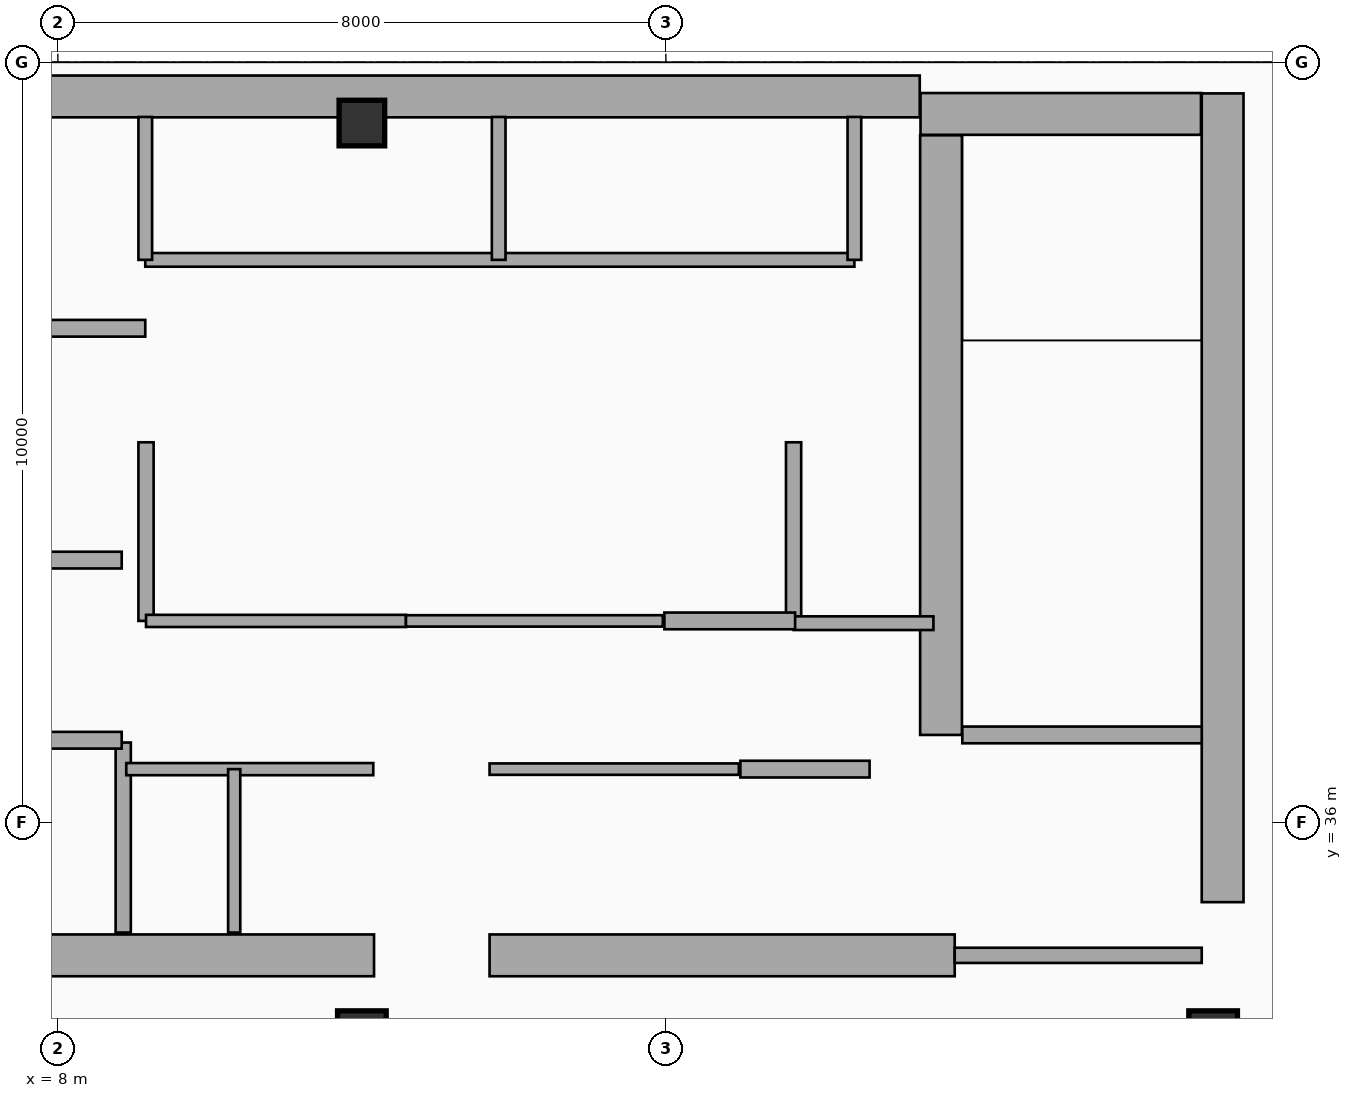
"""IFC4 building model, lengths in metres.
Left out: names, types, materials, properties, quantities, classifications, styles, units other than length and angle.
Written with IfcOpenShell. Run it as: python <this file> out.ifc"""

import sys

from ifc_helpers import new_model, si_unit, direction, frame, frame_2d, origin, origin_2d, place, context, subcontext, project, spatial, rectangle, extrude, element, fill, save


model = new_model("IFC4")
c1 = context("Model", 3, precision=1e-05, world=origin(), true_north=direction((0.0, 1.0)))
c2 = subcontext(c1, "Body", "Model", "MODEL_VIEW")
j1 = project(units=[si_unit("LENGTHUNIT", "METRE"), si_unit("PLANEANGLEUNIT", "RADIAN")], contexts=[c1])
p1 = place(None, origin())
s1 = spatial("IfcSite", under=j1, at=p1, CompositionType="ELEMENT")
p2 = place(p1, origin())
s2 = spatial("IfcBuilding", under=s1, at=p2, CompositionType="ELEMENT")
p3 = place(p2, frame((0.0, 0.0, 347.49)))
s3 = spatial("IfcBuildingStorey", under=s2, at=p3, CompositionType="ELEMENT", Elevation=347.49)
p4 = place(p3, frame((5.36, 45.55, 0.0), z_axis=(0.0, 0.0, 1.0), x_axis=(1.0, 0.0, 0.0)))
e1 = element("IfcWall", 1, at=p4, inside=s3, PredefinedType="SHEAR", context=c2, shape_type="SweptSolid", body=[
    extrude(rectangle(XDim=13.98, YDim=0.55, at=frame_2d((6.99, 0.0))), origin(), (0.0, 0.0, 1.0), 4.62),
])
p5 = place(p3, frame((23.325, 34.95, 0.0), z_axis=(0.0, 0.0, 1.0), x_axis=(0.0, 1.0, 0.0)))
e2 = element("IfcWall", 2, at=p5, inside=s3, PredefinedType="SHEAR", context=c2, shape_type="SweptSolid", body=[
    extrude(rectangle(XDim=10.64, YDim=0.55, at=frame_2d((5.32, 0.0))), origin(), (0.0, 0.0, 1.0), 4.62),
])
p6 = place(p3, frame((1.45, 34.25, 0.0), z_axis=(0.0, 0.0, 1.0), x_axis=(1.0, 0.0, 0.0)))
e3 = element("IfcWall", 3, at=p6, inside=s3, PredefinedType="SHEAR", context=c2, shape_type="SweptSolid", body=[
    extrude(rectangle(XDim=10.71, YDim=0.55, at=frame_2d((5.355, 0.0))), origin(), (0.0, 0.0, 1.0), 4.62),
])
p7 = place(p6, frame((7.25, 0.0, 0.0), z_axis=(0.0, 0.0, 1.0), x_axis=(-1.0, 0.0, 0.0)))
e4 = element("IfcOpeningElement", 4, at=p7, cuts=e3, PredefinedType="OPENING", context=c2, shape_type="SweptSolid", body=[
    extrude(rectangle(XDim=1.1, YDim=2.15, at=frame_2d((0.55, 1.075))), frame((0.0, 0.285, 0.0), z_axis=(0.0, -1.0, 0.0), x_axis=(1.0, 0.0, 0.0)), (0.0, 0.0, 1.0), 0.57),
])
p8 = place(p3, frame((13.68, 34.25, 0.0), z_axis=(0.0, 0.0, 1.0), x_axis=(1.0, 0.0, 0.0)))
e5 = element("IfcWall", 5, at=p8, inside=s3, PredefinedType="SHEAR", context=c2, shape_type="SweptSolid", body=[
    extrude(rectangle(XDim=6.12, YDim=0.55, at=frame_2d((3.06, 0.0))), origin(), (0.0, 0.0, 1.0), 4.62),
])
p9 = place(p3, frame((19.62, 37.15, 0.0), z_axis=(0.0, 0.0, 1.0), x_axis=(0.0, 1.0, 0.0)))
e6 = element("IfcWall", 6, at=p9, inside=s3, PredefinedType="SHEAR", context=c2, shape_type="SweptSolid", body=[
    extrude(rectangle(XDim=7.89, YDim=0.55, at=frame_2d((3.945, 0.0))), origin(), (0.0, 0.0, 1.0), 4.62),
])
p10 = place(p3, frame((19.35, 45.32, 0.0), z_axis=(0.0, 0.0, 1.0), x_axis=(1.0, 0.0, 0.0)))
e7 = element("IfcWall", 7, at=p10, inside=s3, PredefinedType="SHEAR", context=c2, shape_type="SweptSolid", body=[
    extrude(rectangle(XDim=3.69, YDim=0.55, at=frame_2d((1.845, 0.0))), origin(), (0.0, 0.0, 1.0), 4.62),
])
p11 = place(p10, frame((1.15, 0.0, 1.05)))
e8 = element("IfcOpeningElement", 8, at=p11, cuts=e7, PredefinedType="OPENING", context=c2, shape_type="SweptSolid", body=[
    extrude(rectangle(XDim=1.4, YDim=1.8, at=frame_2d((0.7, 0.9))), frame((0.0, 0.285, 0.0), z_axis=(0.0, -1.0, 0.0), x_axis=(1.0, 0.0, 0.0)), (0.0, 0.0, 1.0), 0.57),
])
p12 = place(p3, frame((12.0, 33.2, 0.0), z_axis=(0.0, 0.0, 1.0), x_axis=(1.0, 0.0, 0.0)))
e9 = element("IfcColumn", 9, at=p12, inside=s3, PredefinedType="COLUMN", context=c2, shape_type="SweptSolid", body=[
    extrude(rectangle(XDim=0.64, YDim=0.64, at=origin_2d()), origin(), (0.0, 0.0, 1.0), 4.62),
])
p13 = place(p3, frame((12.0, 45.2, 0.0), z_axis=(0.0, 0.0, 1.0), x_axis=(1.0, 0.0, 0.0)))
e10 = element("IfcColumn", 10, at=p13, inside=s3, PredefinedType="COLUMN", context=c2, shape_type="SweptSolid", body=[
    extrude(rectangle(XDim=0.6, YDim=0.6, at=origin_2d()), origin(), (0.0, 0.0, 1.0), 4.62),
])
p14 = place(p3, frame((23.2, 33.2, 0.0), z_axis=(0.0, 0.0, 1.0), x_axis=(1.0, 0.0, 0.0)))
e11 = element("IfcColumn", 11, at=p14, inside=s3, PredefinedType="COLUMN", context=c2, shape_type="SweptSolid", body=[
    extrude(rectangle(XDim=0.64, YDim=0.64, at=origin_2d()), origin(), (0.0, 0.0, 1.0), 4.62),
])
p15 = place(p3, frame((8.86, 34.55, 0.0), z_axis=(0.0, 0.0, 1.0), x_axis=(0.0, 1.0, 0.0)))
e12 = element("IfcWall", 12, at=p15, inside=s3, PredefinedType="PARTITIONING", context=c2, shape_type="SweptSolid", body=[
    extrude(rectangle(XDim=2.5, YDim=0.2, at=frame_2d((1.25, 0.0))), origin(), (0.0, 0.0, 1.0), 4.37),
])
p16 = place(p3, frame((19.9, 37.15, 0.0), z_axis=(0.0, 0.0, 1.0), x_axis=(1.0, 0.0, 0.0)))
e13 = element("IfcWall", 13, at=p16, inside=s3, PredefinedType="PARTITIONING", context=c2, shape_type="SweptSolid", body=[
    extrude(rectangle(XDim=3.15, YDim=0.22, at=frame_2d((1.575, 0.0))), origin(), (0.0, 0.0, 1.0), 4.37),
])
p17 = place(p16, frame((2.05, 0.0, 0.0), z_axis=(0.0, 0.0, 1.0), x_axis=(-1.0, 0.0, 0.0)))
e14 = element("IfcOpeningElement", 14, at=p17, cuts=e13, PredefinedType="OPENING", context=c2, shape_type="SweptSolid", body=[
    extrude(rectangle(XDim=1.05, YDim=2.15, at=frame_2d((0.525, 1.075))), frame((0.0, 0.12, 0.0), z_axis=(0.0, -1.0, 0.0), x_axis=(1.0, 0.0, 0.0)), (0.0, 0.0, 1.0), 0.24),
])
p18 = place(p3, frame((19.8, 34.25, 0.0), z_axis=(0.0, 0.0, 1.0), x_axis=(1.0, 0.0, 0.0)))
e15 = element("IfcWall", 15, at=p18, inside=s3, PredefinedType="PARTITIONING", context=c2, shape_type="SweptSolid", body=[
    extrude(rectangle(XDim=3.25, YDim=0.2, at=frame_2d((1.625, 0.0))), origin(), (0.0, 0.0, 1.0), 4.37),
])
p19 = place(p18, frame((2.15, 0.0, 0.0), z_axis=(0.0, 0.0, 1.0), x_axis=(-1.0, 0.0, 0.0)))
e16 = element("IfcOpeningElement", 16, at=p19, cuts=e15, PredefinedType="OPENING", context=c2, shape_type="SweptSolid", body=[
    extrude(rectangle(XDim=1.1, YDim=2.15, at=frame_2d((0.55, 1.075))), frame((0.0, 0.11, 0.0), z_axis=(0.0, -1.0, 0.0), x_axis=(1.0, 0.0, 0.0)), (0.0, 0.0, 1.0), 0.22),
])
p20 = place(p3, frame((5.38, 37.08, 0.0), z_axis=(0.0, 0.0, 1.0), x_axis=(1.0, 0.0, 0.0)))
e17 = element("IfcWall", 17, at=p20, inside=s3, PredefinedType="PARTITIONING", context=c2, shape_type="SweptSolid", body=[
    extrude(rectangle(XDim=3.46, YDim=0.22, at=frame_2d((1.73, 0.0))), origin(), (0.0, 0.0, 1.0), 4.37),
])
p21 = place(p20, frame((1.55, 0.0, 0.0), z_axis=(0.0, 0.0, 1.0), x_axis=(-1.0, 0.0, 0.0)))
e18 = element("IfcOpeningElement", 18, at=p21, cuts=e17, PredefinedType="OPENING", context=c2, shape_type="SweptSolid", body=[
    extrude(rectangle(XDim=1.2, YDim=2.2, at=frame_2d((0.6, 1.1))), frame((0.0, 0.12, 0.0), z_axis=(0.0, -1.0, 0.0), x_axis=(1.0, 0.0, 0.0)), (0.0, 0.0, 1.0), 0.24),
])
p22 = place(p20, frame((3.22, 0.0, 0.0), z_axis=(0.0, 0.0, 1.0), x_axis=(-1.0, 0.0, 0.0)))
e19 = element("IfcOpeningElement", 19, at=p22, cuts=e17, PredefinedType="OPENING", context=c2, shape_type="SweptSolid", body=[
    extrude(rectangle(XDim=1.2, YDim=2.2, at=frame_2d((0.6, 1.1))), frame((0.0, 0.12, 0.0), z_axis=(0.0, -1.0, 0.0), x_axis=(1.0, 0.0, 0.0)), (0.0, 0.0, 1.0), 0.24),
])
p23 = place(p3, frame((5.38, 39.45, 0.0), z_axis=(0.0, 0.0, 1.0), x_axis=(1.0, 0.0, 0.0)))
e20 = element("IfcWall", 20, at=p23, inside=s3, PredefinedType="PARTITIONING", context=c2, shape_type="SweptSolid", body=[
    extrude(rectangle(XDim=3.46, YDim=0.22, at=frame_2d((1.73, 0.0))), origin(), (0.0, 0.0, 1.0), 4.37),
])
p24 = place(p3, frame((5.38, 42.5, 0.0), z_axis=(0.0, 0.0, 1.0), x_axis=(1.0, 0.0, 0.0)))
e21 = element("IfcWall", 21, at=p24, inside=s3, PredefinedType="PARTITIONING", context=c2, shape_type="SweptSolid", body=[
    extrude(rectangle(XDim=3.77, YDim=0.22, at=frame_2d((1.885, 0.0))), origin(), (0.0, 0.0, 1.0), 4.37),
])
p25 = place(p24, frame((1.75, 0.0, 0.0), z_axis=(0.0, 0.0, 1.0), x_axis=(-1.0, 0.0, 0.0)))
e22 = element("IfcOpeningElement", 22, at=p25, cuts=e21, PredefinedType="OPENING", context=c2, shape_type="SweptSolid", body=[
    extrude(rectangle(XDim=1.4, YDim=2.2, at=frame_2d((0.7, 1.1))), frame((0.0, 0.12, 0.0), z_axis=(0.0, -1.0, 0.0), x_axis=(1.0, 0.0, 0.0)), (0.0, 0.0, 1.0), 0.24),
])
p26 = place(p24, frame((3.53, 0.0, 0.0), z_axis=(0.0, 0.0, 1.0), x_axis=(-1.0, 0.0, 0.0)))
e23 = element("IfcOpeningElement", 23, at=p26, cuts=e21, PredefinedType="OPENING", context=c2, shape_type="SweptSolid", body=[
    extrude(rectangle(XDim=1.4, YDim=2.2, at=frame_2d((0.7, 1.1))), frame((0.0, 0.12, 0.0), z_axis=(0.0, -1.0, 0.0), x_axis=(1.0, 0.0, 0.0)), (0.0, 0.0, 1.0), 0.24),
])
for number, where, z_axis, x_axis in (
    (24, (9.16, 38.65, 0.0), (0.0, 0.0, 1.0), (0.0, 1.0, 0.0)),
    (25, (17.68, 38.65, 0.0), (0.0, 0.0, 1.0), (0.0, 1.0, 0.0)),
):
    element("IfcWall", number, at=place(p3, frame(where, z_axis=z_axis, x_axis=x_axis)), inside=s3, PredefinedType="PARTITIONING", context=c2, shape_type="SweptSolid", body=[
        extrude(rectangle(XDim=2.35, YDim=0.2, at=frame_2d((1.175, 0.0))), origin(), (0.0, 0.0, 1.0), 4.37),
    ])
p27 = place(p3, frame((17.68, 38.62, 0.0), z_axis=(0.0, 0.0, 1.0), x_axis=(1.0, 0.0, 0.0)))
e26 = element("IfcWall", 26, at=p27, inside=s3, PredefinedType="PARTITIONING", context=c2, shape_type="SweptSolid", body=[
    extrude(rectangle(XDim=1.84, YDim=0.18, at=frame_2d((0.92, 0.0))), origin(), (0.0, 0.0, 1.0), 4.37),
])
p28 = place(p27, frame((0.24, 0.0, 0.0)))
e27 = element("IfcOpeningElement", 27, at=p28, cuts=e26, PredefinedType="OPENING", context=c2, shape_type="SweptSolid", body=[
    extrude(rectangle(XDim=0.92, YDim=2.1, at=frame_2d((0.46, 1.05))), frame((0.0, 0.1, 0.0), z_axis=(0.0, -1.0, 0.0), x_axis=(1.0, 0.0, 0.0)), (0.0, 0.0, 1.0), 0.2),
])
p29 = place(p3, frame((8.9, 36.7, 0.0), z_axis=(0.0, 0.0, 1.0), x_axis=(1.0, 0.0, 0.0)))
e28 = element("IfcWall", 28, at=p29, inside=s3, PredefinedType="PARTITIONING", context=c2, shape_type="SweptSolid", body=[
    extrude(rectangle(XDim=3.25, YDim=0.16, at=frame_2d((1.625, 0.0))), origin(), (0.0, 0.0, 1.0), 4.37),
])
p30 = place(p29, frame((0.26, 0.0, 0.0)))
e29 = element("IfcOpeningElement", 29, at=p30, cuts=e28, PredefinedType="OPENING", context=c2, shape_type="SweptSolid", body=[
    extrude(rectangle(XDim=0.9, YDim=2.15, at=frame_2d((0.45, 1.075))), frame((0.0, 0.09, 0.0), z_axis=(0.0, -1.0, 0.0), x_axis=(1.0, 0.0, 0.0)), (0.0, 0.0, 1.0), 0.18),
])
p31 = place(p29, frame((1.68, 0.0, 0.0)))
e30 = element("IfcOpeningElement", 30, at=p31, cuts=e28, PredefinedType="OPENING", context=c2, shape_type="SweptSolid", body=[
    extrude(rectangle(XDim=0.9, YDim=2.15, at=frame_2d((0.45, 1.075))), frame((0.0, 0.09, 0.0), z_axis=(0.0, -1.0, 0.0), x_axis=(1.0, 0.0, 0.0)), (0.0, 0.0, 1.0), 0.18),
])
p32 = place(p3, frame((10.32, 34.55, 0.0), z_axis=(0.0, 0.0, 1.0), x_axis=(0.0, 1.0, 0.0)))
e31 = element("IfcWall", 31, at=p32, inside=s3, PredefinedType="PARTITIONING", context=c2, shape_type="SweptSolid", body=[
    extrude(rectangle(XDim=2.15, YDim=0.16, at=frame_2d((1.075, 0.0))), origin(), (0.0, 0.0, 1.0), 4.37),
])
p33 = place(p3, frame((9.16, 38.65, 0.0), z_axis=(0.0, 0.0, 1.0), x_axis=(1.0, 0.0, 0.0)))
e32 = element("IfcWall", 32, at=p33, inside=s3, PredefinedType="PARTITIONING", context=c2, shape_type="SweptSolid", body=[
    extrude(rectangle(XDim=3.42, YDim=0.16, at=frame_2d((1.71, 0.0))), origin(), (0.0, 0.0, 1.0), 4.37),
])
p34 = place(p33, frame((2.15, 0.0, 0.0), z_axis=(0.0, 0.0, 1.0), x_axis=(-1.0, 0.0, 0.0)))
e33 = element("IfcOpeningElement", 33, at=p34, cuts=e32, PredefinedType="OPENING", context=c2, shape_type="SweptSolid", body=[
    extrude(rectangle(XDim=0.95, YDim=2.15, at=frame_2d((0.475, 1.075))), frame((0.0, 0.09, 0.0), z_axis=(0.0, -1.0, 0.0), x_axis=(1.0, 0.0, 0.0)), (0.0, 0.0, 1.0), 0.18),
])
p35 = place(p3, frame((13.68, 36.7, 0.0), z_axis=(0.0, 0.0, 1.0), x_axis=(1.0, 0.0, 0.0)))
e34 = element("IfcWall", 34, at=p35, inside=s3, PredefinedType="PARTITIONING", context=c2, shape_type="SweptSolid", body=[
    extrude(rectangle(XDim=3.28, YDim=0.15, at=frame_2d((1.64, 0.0))), origin(), (0.0, 0.0, 1.0), 4.37),
])
p36 = place(p35, frame((1.15, 0.0, 0.0)))
e35 = element("IfcOpeningElement", 35, at=p36, cuts=e34, PredefinedType="OPENING", context=c2, shape_type="SweptSolid", body=[
    extrude(rectangle(XDim=0.95, YDim=2.15, at=frame_2d((0.475, 1.075))), frame((0.0, 0.085, 0.0), z_axis=(0.0, -1.0, 0.0), x_axis=(1.0, 0.0, 0.0)), (0.0, 0.0, 1.0), 0.17),
])
p37 = place(p3, frame((12.58, 38.65, 0.0), z_axis=(0.0, 0.0, 1.0), x_axis=(1.0, 0.0, 0.0)))
e36 = element("IfcWall", 36, at=p37, inside=s3, PredefinedType="PARTITIONING", context=c2, shape_type="SweptSolid", body=[
    extrude(rectangle(XDim=3.38, YDim=0.15, at=frame_2d((1.69, 0.0))), origin(), (0.0, 0.0, 1.0), 4.37),
])
p38 = place(p37, frame((2.2, 0.0, 0.0), z_axis=(0.0, 0.0, 1.0), x_axis=(-1.0, 0.0, 0.0)))
e37 = element("IfcOpeningElement", 37, at=p38, cuts=e36, PredefinedType="OPENING", context=c2, shape_type="SweptSolid", body=[
    extrude(rectangle(XDim=1.05, YDim=2.15, at=frame_2d((0.525, 1.075))), frame((0.0, 0.085, 0.0), z_axis=(0.0, -1.0, 0.0), x_axis=(1.0, 0.0, 0.0)), (0.0, 0.0, 1.0), 0.17),
])
p39 = place(p3, frame((16.98, 36.7, 0.0), z_axis=(0.0, 0.0, 1.0), x_axis=(1.0, 0.0, 0.0)))
e38 = element("IfcWall", 38, at=p39, inside=s3, PredefinedType="PARTITIONING", context=c2, shape_type="SweptSolid", body=[
    extrude(rectangle(XDim=1.7, YDim=0.22, at=frame_2d((0.85, 0.0))), origin(), (0.0, 0.0, 1.0), 4.37),
])
p40 = place(p3, frame((15.98, 38.65, 0.0), z_axis=(0.0, 0.0, 1.0), x_axis=(1.0, 0.0, 0.0)))
e39 = element("IfcWall", 39, at=p40, inside=s3, PredefinedType="PARTITIONING", context=c2, shape_type="SweptSolid", body=[
    extrude(rectangle(XDim=1.72, YDim=0.22, at=frame_2d((0.86, 0.0))), origin(), (0.0, 0.0, 1.0), 4.37),
])
p41 = place(p3, frame((9.15, 43.4, 0.0), z_axis=(0.0, 0.0, 1.0), x_axis=(1.0, 0.0, 0.0)))
e40 = element("IfcWall", 40, at=p41, inside=s3, PredefinedType="PLUMBINGWALL", context=c2, shape_type="SweptSolid", body=[
    extrude(rectangle(XDim=9.33, YDim=0.18, at=frame_2d((4.665, 0.0))), origin(), (0.0, 0.0, 1.0), 4.37),
])
p42 = place(p41, frame((1.88, 0.0, 0.0)))
e41 = element("IfcOpeningElement", 41, at=p42, cuts=e40, PredefinedType="OPENING", context=c2, shape_type="SweptSolid", body=[
    extrude(rectangle(XDim=0.92, YDim=2.1, at=frame_2d((0.46, 1.05))), frame((0.0, 0.1, 0.0), z_axis=(0.0, -1.0, 0.0), x_axis=(1.0, 0.0, 0.0)), (0.0, 0.0, 1.0), 0.2),
])
p43 = place(p41, frame((6.515, 0.0, 0.0)))
e42 = element("IfcOpeningElement", 42, at=p43, cuts=e40, PredefinedType="OPENING", context=c2, shape_type="SweptSolid", body=[
    extrude(rectangle(XDim=0.92, YDim=2.1, at=frame_2d((0.46, 1.05))), frame((0.0, 0.1, 0.0), z_axis=(0.0, -1.0, 0.0), x_axis=(1.0, 0.0, 0.0)), (0.0, 0.0, 1.0), 0.2),
])
for number, where, z_axis, x_axis in (
    (43, (9.15, 43.4, 0.0), (0.0, 0.0, 1.0), (0.0, 1.0, 0.0)),
    (44, (18.48, 43.4, 0.0), (0.0, 0.0, 1.0), (0.0, 1.0, 0.0)),
    (45, (13.8, 43.4, 0.0), (0.0, 0.0, 1.0), (0.0, 1.0, 0.0)),
):
    element("IfcWall", number, at=place(p3, frame(where, z_axis=z_axis, x_axis=x_axis)), inside=s3, PredefinedType="PLUMBINGWALL", context=c2, shape_type="SweptSolid", body=[
        extrude(rectangle(XDim=1.88, YDim=0.18, at=frame_2d((0.94, 0.0))), origin(), (0.0, 0.0, 1.0), 4.37),
    ])
p44 = place(p11, origin())
e46 = element("IfcWindow", 46, at=p44, inside=s3, PartitioningType="SINGLE_PANEL", PredefinedType="WINDOW", context=c2, shape_type="SweptSolid", body=[
    extrude(rectangle(XDim=1.4, YDim=1.8, at=frame_2d((0.7, 0.9))), frame((0.0, 0.03, 0.0), z_axis=(0.0, -1.0, 0.0), x_axis=(1.0, 0.0, 0.0)), (0.0, 0.0, 1.0), 0.06),
])
fill(e8, e46)
p45 = place(p7, origin())
e47 = element("IfcDoor", 47, at=p45, inside=s3, OperationType="SINGLE_SWING_RIGHT", PredefinedType="DOOR", context=c2, shape_type="SweptSolid", body=[
    extrude(rectangle(XDim=1.1, YDim=2.15, at=frame_2d((0.55, 1.075))), frame((0.0, 0.025, 0.0), z_axis=(0.0, -1.0, 0.0), x_axis=(1.0, 0.0, 0.0)), (0.0, 0.0, 1.0), 0.05),
])
fill(e4, e47)
p46 = place(p17, origin())
e48 = element("IfcDoor", 48, at=p46, inside=s3, OperationType="SINGLE_SWING_LEFT", PredefinedType="DOOR", context=c2, shape_type="SweptSolid", body=[
    extrude(rectangle(XDim=1.05, YDim=2.15, at=frame_2d((0.525, 1.075))), frame((0.0, 0.025, 0.0), z_axis=(0.0, -1.0, 0.0), x_axis=(1.0, 0.0, 0.0)), (0.0, 0.0, 1.0), 0.05),
])
fill(e14, e48)
p47 = place(p19, origin())
e49 = element("IfcDoor", 49, at=p47, inside=s3, OperationType="SINGLE_SWING_RIGHT", PredefinedType="DOOR", context=c2, shape_type="SweptSolid", body=[
    extrude(rectangle(XDim=1.1, YDim=2.15, at=frame_2d((0.55, 1.075))), frame((0.0, 0.025, 0.0), z_axis=(0.0, -1.0, 0.0), x_axis=(1.0, 0.0, 0.0)), (0.0, 0.0, 1.0), 0.05),
])
fill(e16, e49)
p48 = place(p22, origin())
e50 = element("IfcDoor", 50, at=p48, inside=s3, OperationType="SLIDING_TO_RIGHT", PredefinedType="DOOR", context=c2, shape_type="SweptSolid", body=[
    extrude(rectangle(XDim=1.2, YDim=2.2, at=frame_2d((0.6, 1.1))), frame((0.0, 0.025, 0.0), z_axis=(0.0, -1.0, 0.0), x_axis=(1.0, 0.0, 0.0)), (0.0, 0.0, 1.0), 0.05),
])
fill(e19, e50)
p49 = place(p26, origin())
e51 = element("IfcDoor", 51, at=p49, inside=s3, OperationType="SLIDING_TO_LEFT", PredefinedType="DOOR", context=c2, shape_type="SweptSolid", body=[
    extrude(rectangle(XDim=1.4, YDim=2.2, at=frame_2d((0.7, 1.1))), frame((0.0, 0.025, 0.0), z_axis=(0.0, -1.0, 0.0), x_axis=(1.0, 0.0, 0.0)), (0.0, 0.0, 1.0), 0.05),
])
fill(e23, e51)
p50 = place(p28, origin())
e52 = element("IfcDoor", 52, at=p50, inside=s3, OperationType="SINGLE_SWING_LEFT", PredefinedType="DOOR", context=c2, shape_type="SweptSolid", body=[
    extrude(rectangle(XDim=0.92, YDim=2.1, at=frame_2d((0.46, 1.05))), frame((0.0, 0.025, 0.0), z_axis=(0.0, -1.0, 0.0), x_axis=(1.0, 0.0, 0.0)), (0.0, 0.0, 1.0), 0.05),
])
fill(e27, e52)
p51 = place(p30, origin())
e53 = element("IfcDoor", 53, at=p51, inside=s3, OperationType="SINGLE_SWING_RIGHT", PredefinedType="DOOR", context=c2, shape_type="SweptSolid", body=[
    extrude(rectangle(XDim=0.9, YDim=2.15, at=frame_2d((0.45, 1.075))), frame((0.0, 0.025, 0.0), z_axis=(0.0, -1.0, 0.0), x_axis=(1.0, 0.0, 0.0)), (0.0, 0.0, 1.0), 0.05),
])
fill(e29, e53)
p52 = place(p31, origin())
e54 = element("IfcDoor", 54, at=p52, inside=s3, OperationType="SINGLE_SWING_LEFT", PredefinedType="DOOR", context=c2, shape_type="SweptSolid", body=[
    extrude(rectangle(XDim=0.9, YDim=2.15, at=frame_2d((0.45, 1.075))), frame((0.0, 0.025, 0.0), z_axis=(0.0, -1.0, 0.0), x_axis=(1.0, 0.0, 0.0)), (0.0, 0.0, 1.0), 0.05),
])
fill(e30, e54)
p53 = place(p34, origin())
e55 = element("IfcDoor", 55, at=p53, inside=s3, OperationType="SINGLE_SWING_RIGHT", PredefinedType="DOOR", context=c2, shape_type="SweptSolid", body=[
    extrude(rectangle(XDim=0.95, YDim=2.15, at=frame_2d((0.475, 1.075))), frame((0.0, 0.025, 0.0), z_axis=(0.0, -1.0, 0.0), x_axis=(1.0, 0.0, 0.0)), (0.0, 0.0, 1.0), 0.05),
])
fill(e33, e55)
p54 = place(p36, origin())
e56 = element("IfcDoor", 56, at=p54, inside=s3, OperationType="SINGLE_SWING_LEFT", PredefinedType="DOOR", context=c2, shape_type="SweptSolid", body=[
    extrude(rectangle(XDim=0.95, YDim=2.15, at=frame_2d((0.475, 1.075))), frame((0.0, 0.025, 0.0), z_axis=(0.0, -1.0, 0.0), x_axis=(1.0, 0.0, 0.0)), (0.0, 0.0, 1.0), 0.05),
])
fill(e35, e56)
p55 = place(p38, origin())
e57 = element("IfcDoor", 57, at=p55, inside=s3, OperationType="SINGLE_SWING_RIGHT", PredefinedType="DOOR", context=c2, shape_type="SweptSolid", body=[
    extrude(rectangle(XDim=1.05, YDim=2.15, at=frame_2d((0.525, 1.075))), frame((0.0, 0.025, 0.0), z_axis=(0.0, -1.0, 0.0), x_axis=(1.0, 0.0, 0.0)), (0.0, 0.0, 1.0), 0.05),
])
fill(e37, e57)
p56 = place(p42, origin())
e58 = element("IfcDoor", 58, at=p56, inside=s3, OperationType="SINGLE_SWING_LEFT", PredefinedType="DOOR", context=c2, shape_type="SweptSolid", body=[
    extrude(rectangle(XDim=0.92, YDim=2.1, at=frame_2d((0.46, 1.05))), frame((0.0, 0.025, 0.0), z_axis=(0.0, -1.0, 0.0), x_axis=(1.0, 0.0, 0.0)), (0.0, 0.0, 1.0), 0.05),
])
fill(e41, e58)
p57 = place(p43, origin())
e59 = element("IfcDoor", 59, at=p57, inside=s3, OperationType="SINGLE_SWING_RIGHT", PredefinedType="DOOR", context=c2, shape_type="SweptSolid", body=[
    extrude(rectangle(XDim=0.92, YDim=2.1, at=frame_2d((0.46, 1.05))), frame((0.0, 0.025, 0.0), z_axis=(0.0, -1.0, 0.0), x_axis=(1.0, 0.0, 0.0)), (0.0, 0.0, 1.0), 0.05),
])
fill(e42, e59)
save(model, sys.argv[1])
